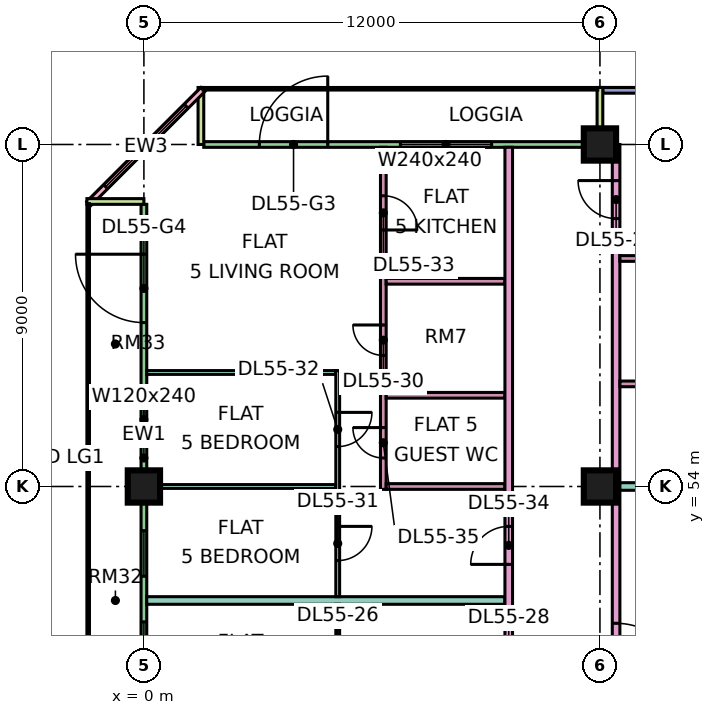
"""IFC4 building model, lengths in metres.
Left out: names, types, materials, properties, quantities, classifications, styles, units other than length and angle.
Written with IfcOpenShell. Run it as: python <this file> out.ifc"""

import sys

from ifc_helpers import new_model, si_unit, direction, frame, frame_2d, origin, origin_2d, place, context, subcontext, project, spatial, rectangle, extrude, element, fill, save


model = new_model("IFC4")
c1 = context("Model", 3, precision=1e-05, world=origin(), true_north=direction((0.0, 1.0)))
c2 = subcontext(c1, "Body", "Model", "MODEL_VIEW")
j1 = project(units=[si_unit("LENGTHUNIT", "METRE"), si_unit("PLANEANGLEUNIT", "RADIAN")], contexts=[c1])
p1 = place(None, origin())
s1 = spatial("IfcSite", under=j1, at=p1, CompositionType="ELEMENT")
p2 = place(p1, origin())
s2 = spatial("IfcBuilding", under=s1, at=p2, CompositionType="ELEMENT")
p3 = place(p2, frame((0.0, 0.0, 234.15)))
s3 = spatial("IfcBuildingStorey", under=s2, at=p3, CompositionType="ELEMENT", Elevation=234.15)
for number, where, z_axis, x_axis in (
    (1, (0.0, 54.0, 0.0), (0.0, 0.0, 1.0), (1.0, 0.0, 0.0)),
    (2, (12.0, 54.0, 0.0), (0.0, 0.0, 1.0), (1.0, 0.0, 0.0)),
    (3, (12.0, 63.0, 0.0), (0.0, 0.0, 1.0), (1.0, 0.0, 0.0)),
):
    element("IfcColumn", number, at=place(p3, frame(where, z_axis=z_axis, x_axis=x_axis)), inside=s3, PredefinedType="COLUMN", context=c2, shape_type="SweptSolid", body=[
        extrude(rectangle(XDim=0.85, YDim=0.85, at=origin_2d()), origin(), (0.0, 0.0, 1.0), 3.75),
    ])
p4 = place(p3, frame((22.5, 64.425, 0.0), z_axis=(0.0, 0.0, 1.0), x_axis=(-1.0, 0.0, 0.0)))
e4 = element("IfcWall", 4, at=p4, inside=s3, PredefinedType="SOLIDWALL", context=c2, shape_type="SweptSolid", body=[
    extrude(rectangle(XDim=10.425, YDim=0.15, at=frame_2d((5.212, 0.0))), origin(), (0.0, 0.0, 1.0), 3.35),
])
p5 = place(p4, frame((0.538, 0.0, 0.45)))
e5 = element("IfcOpeningElement", 5, at=p5, cuts=e4, PredefinedType="OPENING", context=c2, shape_type="SweptSolid", body=[
    extrude(rectangle(XDim=2.4, YDim=2.4, at=frame_2d((1.2, 1.2))), frame((0.0, 0.085, 0.0), z_axis=(0.0, -1.0, 0.0), x_axis=(1.0, 0.0, 0.0)), (0.0, 0.0, 1.0), 0.17),
])
p6 = place(p4, frame((5.275, 0.0, 0.45)))
e6 = element("IfcOpeningElement", 6, at=p6, cuts=e4, PredefinedType="OPENING", context=c2, shape_type="SweptSolid", body=[
    extrude(rectangle(XDim=3.0, YDim=2.4, at=frame_2d((1.5, 1.2))), frame((0.0, 0.085, 0.0), z_axis=(0.0, -1.0, 0.0), x_axis=(1.0, 0.0, 0.0)), (0.0, 0.0, 1.0), 0.17),
])
p7 = place(p3, frame((11.925, 63.0, 0.0), z_axis=(0.0, 0.0, 1.0), x_axis=(-1.0, 0.0, 0.0)))
e7 = element("IfcWall", 7, at=p7, inside=s3, PredefinedType="SOLIDWALL", context=c2, shape_type="SweptSolid", body=[
    extrude(rectangle(XDim=10.35, YDim=0.15, at=frame_2d((5.175, 0.0))), origin(), (0.0, 0.0, 1.0), 3.35),
])
p8 = place(p7, frame((2.775, 0.0, 0.45)))
e8 = element("IfcOpeningElement", 8, at=p8, cuts=e7, PredefinedType="OPENING", context=c2, shape_type="SweptSolid", body=[
    extrude(rectangle(XDim=2.4, YDim=2.4, at=frame_2d((1.2, 1.2))), frame((0.0, 0.085, 0.0), z_axis=(0.0, -1.0, 0.0), x_axis=(1.0, 0.0, 0.0)), (0.0, 0.0, 1.0), 0.17),
])
p9 = place(p7, frame((7.087, 0.0, 0.0)))
e9 = element("IfcOpeningElement", 9, at=p9, cuts=e7, PredefinedType="OPENING", context=c2, shape_type="SweptSolid", body=[
    extrude(rectangle(XDim=1.8, YDim=2.4, at=frame_2d((0.9, 1.2))), frame((0.0, 0.085, 0.0), z_axis=(0.0, -1.0, 0.0), x_axis=(1.0, 0.0, 0.0)), (0.0, 0.0, 1.0), 0.17),
])
for number, where, z_axis, x_axis in (
    (10, (12.0, 64.5, 0.0), (0.0, 0.0, 1.0), (0.0, -1.0, 0.0)),
    (11, (1.5, 64.5, 0.0), (0.0, 0.0, 1.0), (0.0, -1.0, 0.0)),
):
    element("IfcWall", number, at=place(p3, frame(where, z_axis=z_axis, x_axis=x_axis)), inside=s3, PredefinedType="SOLIDWALL", context=c2, shape_type="SweptSolid", body=[
        extrude(rectangle(XDim=1.5, YDim=0.15, at=frame_2d((0.75, 0.0))), origin(), (0.0, 0.0, 1.0), 3.35),
    ])
p10 = place(p3, frame((1.553, 64.447, 0.0), z_axis=(0.0, 0.0, 1.0), x_axis=(-0.707106781187, -0.707106781187, 0.0)))
e12 = element("IfcWall", 12, at=p10, inside=s3, PredefinedType="SOLIDWALL", context=c2, shape_type="SweptSolid", body=[
    extrude(rectangle(XDim=4.243, YDim=0.15, at=frame_2d((2.121, 0.0))), origin(), (0.0, 0.0, 1.0), 3.35),
])
p11 = place(p10, frame((0.621, 0.0, 0.45)))
e13 = element("IfcOpeningElement", 13, at=p11, cuts=e12, PredefinedType="OPENING", context=c2, shape_type="SweptSolid", body=[
    extrude(rectangle(XDim=3.0, YDim=2.4, at=frame_2d((1.5, 1.2))), frame((0.0, 0.085, 0.0), z_axis=(0.0, -1.0, 0.0), x_axis=(1.0, 0.0, 0.0)), (0.0, 0.0, 1.0), 0.17),
])
p12 = place(p3, frame((0.0, 61.425, 0.0), z_axis=(0.0, 0.0, 1.0), x_axis=(0.0, -1.0, 0.0)))
e14 = element("IfcWall", 14, at=p12, inside=s3, PredefinedType="SOLIDWALL", context=c2, shape_type="SweptSolid", body=[
    extrude(rectangle(XDim=13.35, YDim=0.15, at=frame_2d((6.675, 0.0))), origin(), (0.0, 0.0, 1.0), 3.35),
])
p13 = place(p12, frame((1.312, 0.0, 0.0)))
e15 = element("IfcOpeningElement", 15, at=p13, cuts=e14, PredefinedType="OPENING", context=c2, shape_type="SweptSolid", body=[
    extrude(rectangle(XDim=1.8, YDim=2.4, at=frame_2d((0.9, 1.2))), frame((0.0, 0.085, 0.0), z_axis=(0.0, -1.0, 0.0), x_axis=(1.0, 0.0, 0.0)), (0.0, 0.0, 1.0), 0.17),
])
p14 = place(p12, frame((5.062, 0.0, 0.45)))
e16 = element("IfcOpeningElement", 16, at=p14, cuts=e14, PredefinedType="OPENING", context=c2, shape_type="SweptSolid", body=[
    extrude(rectangle(XDim=1.2, YDim=2.4, at=frame_2d((0.6, 1.2))), frame((0.0, 0.085, 0.0), z_axis=(0.0, -1.0, 0.0), x_axis=(1.0, 0.0, 0.0)), (0.0, 0.0, 1.0), 0.17),
])
p15 = place(p12, frame((8.587, 0.0, 0.45)))
e17 = element("IfcOpeningElement", 17, at=p15, cuts=e14, PredefinedType="OPENING", context=c2, shape_type="SweptSolid", body=[
    extrude(rectangle(XDim=1.2, YDim=2.4, at=frame_2d((0.6, 1.2))), frame((0.0, 0.085, 0.0), z_axis=(0.0, -1.0, 0.0), x_axis=(1.0, 0.0, 0.0)), (0.0, 0.0, 1.0), 0.17),
])
p16 = place(p12, frame((10.988, 0.0, 0.45)))
e18 = element("IfcOpeningElement", 18, at=p16, cuts=e14, PredefinedType="OPENING", context=c2, shape_type="SweptSolid", body=[
    extrude(rectangle(XDim=1.8, YDim=2.4, at=frame_2d((0.9, 1.2))), frame((0.0, 0.085, 0.0), z_axis=(0.0, -1.0, 0.0), x_axis=(1.0, 0.0, 0.0)), (0.0, 0.0, 1.0), 0.17),
])
p17 = place(p3, frame((-1.5, 61.5, 0.0), z_axis=(0.0, 0.0, 1.0), x_axis=(1.0, 0.0, 0.0)))
e19 = element("IfcWall", 19, at=p17, inside=s3, PredefinedType="SOLIDWALL", context=c2, shape_type="SweptSolid", body=[
    extrude(rectangle(XDim=1.5, YDim=0.15, at=frame_2d((0.75, 0.0))), origin(), (0.0, 0.0, 1.0), 3.35),
])
p18 = place(p3, frame((0.074, 51.0, 0.0), z_axis=(0.0, 0.0, 1.0), x_axis=(1.0, 0.0, 0.0)))
e20 = element("IfcWall", 20, at=p18, inside=s3, PredefinedType="PARTITIONING", context=c2, shape_type="SweptSolid", body=[
    extrude(rectangle(XDim=9.426, YDim=0.2, at=frame_2d((4.713, 0.0))), origin(), (0.0, 0.0, 1.0), 3.35),
])
for number, where, z_axis, x_axis in (
    (21, (0.074, 54.0, 0.0), (0.0, 0.0, 1.0), (1.0, 0.0, 0.0)),
    (22, (0.074, 57.0, 0.0), (0.0, 0.0, 1.0), (1.0, 0.0, 0.0)),
):
    element("IfcWall", number, at=place(p3, frame(where, z_axis=z_axis, x_axis=x_axis)), inside=s3, PredefinedType="PARTITIONING", context=c2, shape_type="SweptSolid", body=[
        extrude(rectangle(XDim=4.976, YDim=0.1, at=frame_2d((2.488, 0.0))), origin(), (0.0, 0.0, 1.0), 3.35),
    ])
p19 = place(p3, frame((5.1, 44.95, 0.0), z_axis=(0.0, 0.0, 1.0), x_axis=(0.0, 1.0, 0.0)))
e23 = element("IfcWall", 23, at=p19, inside=s3, PredefinedType="PARTITIONING", context=c2, shape_type="SweptSolid", body=[
    extrude(rectangle(XDim=5.95, YDim=0.1, at=frame_2d((2.975, 0.0))), origin(), (0.0, 0.0, 1.0), 3.35),
])
p20 = place(p19, frame((1.1, 0.0, 0.0)))
e24 = element("IfcOpeningElement", 24, at=p20, cuts=e23, PredefinedType="OPENING", context=c2, shape_type="SweptSolid", body=[
    extrude(rectangle(XDim=0.9, YDim=2.1, at=frame_2d((0.45, 1.05))), frame((0.0, 0.06, 0.0), z_axis=(0.0, -1.0, 0.0), x_axis=(1.0, 0.0, 0.0)), (0.0, 0.0, 1.0), 0.12),
])
p21 = place(p19, frame((4.1, 0.0, 0.0)))
e25 = element("IfcOpeningElement", 25, at=p21, cuts=e23, PredefinedType="OPENING", context=c2, shape_type="SweptSolid", body=[
    extrude(rectangle(XDim=0.9, YDim=2.1, at=frame_2d((0.45, 1.05))), frame((0.0, 0.06, 0.0), z_axis=(0.0, -1.0, 0.0), x_axis=(1.0, 0.0, 0.0)), (0.0, 0.0, 1.0), 0.12),
])
p22 = place(p3, frame((5.1, 51.1, 0.0), z_axis=(0.0, 0.0, 1.0), x_axis=(0.0, 1.0, 0.0)))
e26 = element("IfcWall", 26, at=p22, inside=s3, PredefinedType="PARTITIONING", context=c2, shape_type="SweptSolid", body=[
    extrude(rectangle(XDim=5.95, YDim=0.1, at=frame_2d((2.975, 0.0))), origin(), (0.0, 0.0, 1.0), 3.35),
])
p23 = place(p22, frame((0.95, 0.0, 0.0)))
e27 = element("IfcOpeningElement", 27, at=p23, cuts=e26, PredefinedType="OPENING", context=c2, shape_type="SweptSolid", body=[
    extrude(rectangle(XDim=0.9, YDim=2.1, at=frame_2d((0.45, 1.05))), frame((0.0, 0.06, 0.0), z_axis=(0.0, -1.0, 0.0), x_axis=(1.0, 0.0, 0.0)), (0.0, 0.0, 1.0), 0.12),
])
p24 = place(p22, frame((3.95, 0.0, 0.0)))
e28 = element("IfcOpeningElement", 28, at=p24, cuts=e26, PredefinedType="OPENING", context=c2, shape_type="SweptSolid", body=[
    extrude(rectangle(XDim=0.9, YDim=2.1, at=frame_2d((0.45, 1.05))), frame((0.0, 0.06, 0.0), z_axis=(0.0, -1.0, 0.0), x_axis=(1.0, 0.0, 0.0)), (0.0, 0.0, 1.0), 0.12),
])
p25 = place(p3, frame((6.3, 53.925, 0.0), z_axis=(0.0, 0.0, 1.0), x_axis=(0.0, 1.0, 0.0)))
e29 = element("IfcWall", 29, at=p25, inside=s3, PredefinedType="PARTITIONING", context=c2, shape_type="SweptSolid", body=[
    extrude(rectangle(XDim=9.001, YDim=0.15, at=frame_2d((4.5, 0.0))), origin(), (0.0, 0.0, 1.0), 3.35),
])
p26 = place(p25, frame((3.525, 0.0, 0.0)))
e30 = element("IfcOpeningElement", 30, at=p26, cuts=e29, PredefinedType="OPENING", context=c2, shape_type="SweptSolid", body=[
    extrude(rectangle(XDim=0.8, YDim=2.1, at=frame_2d((0.4, 1.05))), frame((0.0, 0.085, 0.0), z_axis=(0.0, -1.0, 0.0), x_axis=(1.0, 0.0, 0.0)), (0.0, 0.0, 1.0), 0.17),
])
p27 = place(p25, frame((6.825, 0.0, 0.0)))
e31 = element("IfcOpeningElement", 31, at=p27, cuts=e29, PredefinedType="OPENING", context=c2, shape_type="SweptSolid", body=[
    extrude(rectangle(XDim=0.9, YDim=2.1, at=frame_2d((0.45, 1.05))), frame((0.0, 0.085, 0.0), z_axis=(0.0, -1.0, 0.0), x_axis=(1.0, 0.0, 0.0)), (0.0, 0.0, 1.0), 0.17),
])
p28 = place(p25, frame((0.825, 0.0, 0.0)))
e32 = element("IfcOpeningElement", 32, at=p28, cuts=e29, PredefinedType="OPENING", context=c2, shape_type="SweptSolid", body=[
    extrude(rectangle(XDim=0.8, YDim=2.1, at=frame_2d((0.4, 1.05))), frame((0.0, 0.085, 0.0), z_axis=(0.0, -1.0, 0.0), x_axis=(1.0, 0.0, 0.0)), (0.0, 0.0, 1.0), 0.17),
])
for number, where, z_axis, x_axis in (
    (33, (6.375, 54.0, 0.0), (0.0, 0.0, 1.0), (1.0, 0.0, 0.0)),
    (34, (6.375, 56.4, 0.0), (0.0, 0.0, 1.0), (1.0, 0.0, 0.0)),
    (35, (6.375, 59.4, 0.0), (0.0, 0.0, 1.0), (1.0, 0.0, 0.0)),
):
    element("IfcWall", number, at=place(p3, frame(where, z_axis=z_axis, x_axis=x_axis)), inside=s3, PredefinedType="PARTITIONING", context=c2, shape_type="SweptSolid", body=[
        extrude(rectangle(XDim=3.125, YDim=0.15, at=frame_2d((1.562, 0.0))), origin(), (0.0, 0.0, 1.0), 3.35),
    ])
p29 = place(p3, frame((9.6, 20.0, 0.0), z_axis=(0.0, 0.0, 1.0), x_axis=(0.0, 1.0, 0.0)))
e36 = element("IfcWall", 36, at=p29, inside=s3, PredefinedType="PARTITIONING", context=c2, shape_type="SweptSolid", body=[
    extrude(rectangle(XDim=42.926, YDim=0.2, at=frame_2d((21.463, 0.0))), origin(), (0.0, 0.0, 1.0), 3.35),
])
p30 = place(p29, frame((28.95, 0.0, 0.0)))
e37 = element("IfcOpeningElement", 37, at=p30, cuts=e36, PredefinedType="OPENING", context=c2, shape_type="SweptSolid", body=[
    extrude(rectangle(XDim=1.0, YDim=2.1, at=frame_2d((0.5, 1.05))), frame((0.0, 0.11, 0.0), z_axis=(0.0, -1.0, 0.0), x_axis=(1.0, 0.0, 0.0)), (0.0, 0.0, 1.0), 0.22),
])
p31 = place(p29, frame((31.95, 0.0, 0.0)))
e38 = element("IfcOpeningElement", 38, at=p31, cuts=e36, PredefinedType="OPENING", context=c2, shape_type="SweptSolid", body=[
    extrude(rectangle(XDim=1.0, YDim=2.1, at=frame_2d((0.5, 1.05))), frame((0.0, 0.11, 0.0), z_axis=(0.0, -1.0, 0.0), x_axis=(1.0, 0.0, 0.0)), (0.0, 0.0, 1.0), 0.22),
])
p32 = place(p29, frame((0.6, 0.0, 0.0)))
e39 = element("IfcOpeningElement", 39, at=p32, cuts=e36, PredefinedType="OPENING", context=c2, shape_type="SweptSolid", body=[
    extrude(rectangle(XDim=1.2, YDim=2.1, at=frame_2d((0.6, 1.05))), frame((0.0, 0.11, 0.0), z_axis=(0.0, -1.0, 0.0), x_axis=(1.0, 0.0, 0.0)), (0.0, 0.0, 1.0), 0.22),
])
p33 = place(p29, frame((11.25, 0.0, 0.0)))
e40 = element("IfcOpeningElement", 40, at=p33, cuts=e36, PredefinedType="OPENING", context=c2, shape_type="SweptSolid", body=[
    extrude(rectangle(XDim=1.0, YDim=2.1, at=frame_2d((0.5, 1.05))), frame((0.0, 0.11, 0.0), z_axis=(0.0, -1.0, 0.0), x_axis=(1.0, 0.0, 0.0)), (0.0, 0.0, 1.0), 0.22),
])
p34 = place(p3, frame((12.425, 20.0, 0.0), z_axis=(0.0, 0.0, 1.0), x_axis=(0.0, 1.0, 0.0)))
e41 = element("IfcWall", 41, at=p34, inside=s3, PredefinedType="PARTITIONING", context=c2, shape_type="SweptSolid", body=[
    extrude(rectangle(XDim=43.0, YDim=0.2, at=frame_2d((21.5, 0.0))), origin(), (0.0, 0.0, 1.0), 3.35),
])
p35 = place(p34, frame((5.95, 0.0, 0.0)))
e42 = element("IfcOpeningElement", 42, at=p35, cuts=e41, PredefinedType="OPENING", context=c2, shape_type="SweptSolid", body=[
    extrude(rectangle(XDim=1.0, YDim=2.1, at=frame_2d((0.5, 1.05))), frame((0.0, 0.11, 0.0), z_axis=(0.0, -1.0, 0.0), x_axis=(1.0, 0.0, 0.0)), (0.0, 0.0, 1.0), 0.22),
])
p36 = place(p34, frame((12.0, 0.0, 0.0)))
e43 = element("IfcOpeningElement", 43, at=p36, cuts=e41, PredefinedType="OPENING", context=c2, shape_type="SweptSolid", body=[
    extrude(rectangle(XDim=1.0, YDim=2.1, at=frame_2d((0.5, 1.05))), frame((0.0, 0.11, 0.0), z_axis=(0.0, -1.0, 0.0), x_axis=(1.0, 0.0, 0.0)), (0.0, 0.0, 1.0), 0.22),
])
p37 = place(p34, frame((16.9, 0.0, 0.0)))
e44 = element("IfcOpeningElement", 44, at=p37, cuts=e41, PredefinedType="OPENING", context=c2, shape_type="SweptSolid", body=[
    extrude(rectangle(XDim=1.0, YDim=2.1, at=frame_2d((0.5, 1.05))), frame((0.0, 0.11, 0.0), z_axis=(0.0, -1.0, 0.0), x_axis=(1.0, 0.0, 0.0)), (0.0, 0.0, 1.0), 0.22),
])
p38 = place(p34, frame((41.05, 0.0, 0.0)))
e45 = element("IfcOpeningElement", 45, at=p38, cuts=e41, PredefinedType="OPENING", context=c2, shape_type="SweptSolid", body=[
    extrude(rectangle(XDim=1.0, YDim=2.1, at=frame_2d((0.5, 1.05))), frame((0.0, 0.11, 0.0), z_axis=(0.0, -1.0, 0.0), x_axis=(1.0, 0.0, 0.0)), (0.0, 0.0, 1.0), 0.22),
])
p39 = place(p34, frame((1.15, 0.0, 0.0)))
e46 = element("IfcOpeningElement", 46, at=p39, cuts=e41, PredefinedType="OPENING", context=c2, shape_type="SweptSolid", body=[
    extrude(rectangle(XDim=1.8, YDim=2.1, at=frame_2d((0.9, 1.05))), frame((0.0, 0.11, 0.0), z_axis=(0.0, -1.0, 0.0), x_axis=(1.0, 0.0, 0.0)), (0.0, 0.0, 1.0), 0.22),
])
p40 = place(p34, frame((28.6, 0.0, 0.0)))
e47 = element("IfcOpeningElement", 47, at=p40, cuts=e41, PredefinedType="OPENING", context=c2, shape_type="SweptSolid", body=[
    extrude(rectangle(XDim=1.8, YDim=2.1, at=frame_2d((0.9, 1.05))), frame((0.0, 0.11, 0.0), z_axis=(0.0, -1.0, 0.0), x_axis=(1.0, 0.0, 0.0)), (0.0, 0.0, 1.0), 0.22),
])
p41 = place(p3, frame((12.525, 54.0, 0.0), z_axis=(0.0, 0.0, 1.0), x_axis=(1.0, 0.0, 0.0)))
e48 = element("IfcWall", 48, at=p41, inside=s3, PredefinedType="PARTITIONING", context=c2, shape_type="SweptSolid", body=[
    extrude(rectangle(XDim=11.401, YDim=0.2, at=frame_2d((5.701, 0.0))), origin(), (0.0, 0.0, 1.0), 3.35),
])
for number, where, z_axis, x_axis in (
    (49, (12.525, 56.7, 0.0), (0.0, 0.0, 1.0), (1.0, 0.0, 0.0)),
    (50, (12.525, 60.0, 0.0), (0.0, 0.0, 1.0), (1.0, 0.0, 0.0)),
):
    element("IfcWall", number, at=place(p3, frame(where, z_axis=z_axis, x_axis=x_axis)), inside=s3, PredefinedType="PARTITIONING", context=c2, shape_type="SweptSolid", body=[
        extrude(rectangle(XDim=5.225, YDim=0.15, at=frame_2d((2.613, 0.0))), origin(), (0.0, 0.0, 1.0), 3.35),
    ])
p42 = place(p8, origin())
e51 = element("IfcWindow", 51, at=p42, inside=s3, PartitioningType="SINGLE_PANEL", PredefinedType="WINDOW", context=c2, shape_type="SweptSolid", body=[
    extrude(rectangle(XDim=2.4, YDim=2.4, at=frame_2d((1.2, 1.2))), frame((0.0, 0.03, 0.0), z_axis=(0.0, -1.0, 0.0), x_axis=(1.0, 0.0, 0.0)), (0.0, 0.0, 1.0), 0.06),
])
fill(e8, e51)
p43 = place(p9, frame((1.8, 0.0, 0.0), z_axis=(0.0, 0.0, 1.0), x_axis=(-1.0, 0.0, 0.0)))
e52 = element("IfcDoor", 52, at=p43, inside=s3, OperationType="DOUBLE_DOOR_SINGLE_SWING", PredefinedType="DOOR", context=c2, shape_type="SweptSolid", body=[
    extrude(rectangle(XDim=1.8, YDim=2.4, at=frame_2d((0.9, 1.2))), frame((0.0, 0.025, 0.0), z_axis=(0.0, -1.0, 0.0), x_axis=(1.0, 0.0, 0.0)), (0.0, 0.0, 1.0), 0.05),
])
fill(e9, e52)
p44 = place(p11, origin())
e53 = element("IfcWindow", 53, at=p44, inside=s3, PartitioningType="SINGLE_PANEL", PredefinedType="WINDOW", context=c2, shape_type="SweptSolid", body=[
    extrude(rectangle(XDim=3.0, YDim=2.4, at=frame_2d((1.5, 1.2))), frame((0.0, 0.03, 0.0), z_axis=(0.0, -1.0, 0.0), x_axis=(1.0, 0.0, 0.0)), (0.0, 0.0, 1.0), 0.06),
])
fill(e13, e53)
p45 = place(p13, frame((1.8, 0.0, 0.0), z_axis=(0.0, 0.0, 1.0), x_axis=(-1.0, 0.0, 0.0)))
e54 = element("IfcDoor", 54, at=p45, inside=s3, OperationType="DOUBLE_DOOR_SINGLE_SWING", PredefinedType="DOOR", context=c2, shape_type="SweptSolid", body=[
    extrude(rectangle(XDim=1.8, YDim=2.4, at=frame_2d((0.9, 1.2))), frame((0.0, 0.025, 0.0), z_axis=(0.0, -1.0, 0.0), x_axis=(1.0, 0.0, 0.0)), (0.0, 0.0, 1.0), 0.05),
])
fill(e15, e54)
p46 = place(p14, origin())
e55 = element("IfcWindow", 55, at=p46, inside=s3, PartitioningType="SINGLE_PANEL", PredefinedType="WINDOW", context=c2, shape_type="SweptSolid", body=[
    extrude(rectangle(XDim=1.2, YDim=2.4, at=frame_2d((0.6, 1.2))), frame((0.0, 0.03, 0.0), z_axis=(0.0, -1.0, 0.0), x_axis=(1.0, 0.0, 0.0)), (0.0, 0.0, 1.0), 0.06),
])
fill(e16, e55)
p47 = place(p15, origin())
e56 = element("IfcWindow", 56, at=p47, inside=s3, PartitioningType="SINGLE_PANEL", PredefinedType="WINDOW", context=c2, shape_type="SweptSolid", body=[
    extrude(rectangle(XDim=1.2, YDim=2.4, at=frame_2d((0.6, 1.2))), frame((0.0, 0.03, 0.0), z_axis=(0.0, -1.0, 0.0), x_axis=(1.0, 0.0, 0.0)), (0.0, 0.0, 1.0), 0.06),
])
fill(e17, e56)
p48 = place(p16, origin())
e57 = element("IfcWindow", 57, at=p48, inside=s3, PartitioningType="SINGLE_PANEL", PredefinedType="WINDOW", context=c2, shape_type="SweptSolid", body=[
    extrude(rectangle(XDim=1.8, YDim=2.4, at=frame_2d((0.9, 1.2))), frame((0.0, 0.03, 0.0), z_axis=(0.0, -1.0, 0.0), x_axis=(1.0, 0.0, 0.0)), (0.0, 0.0, 1.0), 0.06),
])
fill(e18, e57)
p49 = place(p38, frame((1.0, 0.0, 0.0), z_axis=(0.0, 0.0, 1.0), x_axis=(-1.0, 0.0, 0.0)))
e58 = element("IfcDoor", 58, at=p49, inside=s3, OperationType="SINGLE_SWING_RIGHT", PredefinedType="DOOR", context=c2, shape_type="SweptSolid", body=[
    extrude(rectangle(XDim=1.0, YDim=2.1, at=frame_2d((0.5, 1.05))), frame((0.0, 0.025, 0.0), z_axis=(0.0, -1.0, 0.0), x_axis=(1.0, 0.0, 0.0)), (0.0, 0.0, 1.0), 0.05),
])
fill(e45, e58)
p50 = place(p26, frame((0.8, 0.0, 0.0), z_axis=(0.0, 0.0, 1.0), x_axis=(-1.0, 0.0, 0.0)))
e59 = element("IfcDoor", 59, at=p50, inside=s3, OperationType="SINGLE_SWING_RIGHT", PredefinedType="DOOR", context=c2, shape_type="SweptSolid", body=[
    extrude(rectangle(XDim=0.8, YDim=2.1, at=frame_2d((0.4, 1.05))), frame((0.0, 0.025, 0.0), z_axis=(0.0, -1.0, 0.0), x_axis=(1.0, 0.0, 0.0)), (0.0, 0.0, 1.0), 0.05),
])
fill(e30, e59)
p51 = place(p23, origin())
e60 = element("IfcDoor", 60, at=p51, inside=s3, OperationType="SINGLE_SWING_RIGHT", PredefinedType="DOOR", context=c2, shape_type="SweptSolid", body=[
    extrude(rectangle(XDim=0.9, YDim=2.1, at=frame_2d((0.45, 1.05))), frame((0.0, 0.025, 0.0), z_axis=(0.0, -1.0, 0.0), x_axis=(1.0, 0.0, 0.0)), (0.0, 0.0, 1.0), 0.05),
])
fill(e27, e60)
p52 = place(p24, origin())
e61 = element("IfcDoor", 61, at=p52, inside=s3, OperationType="SINGLE_SWING_RIGHT", PredefinedType="DOOR", context=c2, shape_type="SweptSolid", body=[
    extrude(rectangle(XDim=0.9, YDim=2.1, at=frame_2d((0.45, 1.05))), frame((0.0, 0.025, 0.0), z_axis=(0.0, -1.0, 0.0), x_axis=(1.0, 0.0, 0.0)), (0.0, 0.0, 1.0), 0.05),
])
fill(e28, e61)
p53 = place(p27, frame((0.9, 0.0, 0.0), z_axis=(0.0, 0.0, 1.0), x_axis=(-1.0, 0.0, 0.0)))
e62 = element("IfcDoor", 62, at=p53, inside=s3, OperationType="SINGLE_SWING_LEFT", PredefinedType="DOOR", context=c2, shape_type="SweptSolid", body=[
    extrude(rectangle(XDim=0.9, YDim=2.1, at=frame_2d((0.45, 1.05))), frame((0.0, 0.025, 0.0), z_axis=(0.0, -1.0, 0.0), x_axis=(1.0, 0.0, 0.0)), (0.0, 0.0, 1.0), 0.05),
])
fill(e31, e62)
p54 = place(p31, origin())
e63 = element("IfcDoor", 63, at=p54, inside=s3, OperationType="SINGLE_SWING_LEFT", PredefinedType="DOOR", context=c2, shape_type="SweptSolid", body=[
    extrude(rectangle(XDim=1.0, YDim=2.1, at=frame_2d((0.5, 1.05))), frame((0.0, 0.025, 0.0), z_axis=(0.0, -1.0, 0.0), x_axis=(1.0, 0.0, 0.0)), (0.0, 0.0, 1.0), 0.05),
])
fill(e38, e63)
p55 = place(p28, frame((0.8, 0.0, 0.0), z_axis=(0.0, 0.0, 1.0), x_axis=(-1.0, 0.0, 0.0)))
e64 = element("IfcDoor", 64, at=p55, inside=s3, OperationType="SINGLE_SWING_RIGHT", PredefinedType="DOOR", context=c2, shape_type="SweptSolid", body=[
    extrude(rectangle(XDim=0.8, YDim=2.1, at=frame_2d((0.4, 1.05))), frame((0.0, 0.025, 0.0), z_axis=(0.0, -1.0, 0.0), x_axis=(1.0, 0.0, 0.0)), (0.0, 0.0, 1.0), 0.05),
])
fill(e32, e64)
p56 = place(p40, frame((1.8, 0.0, 0.0), z_axis=(0.0, 0.0, 1.0), x_axis=(-1.0, 0.0, 0.0)))
e65 = element("IfcDoor", 65, at=p56, inside=s3, OperationType="DOUBLE_DOOR_SINGLE_SWING", PredefinedType="DOOR", context=c2, shape_type="SweptSolid", body=[
    extrude(rectangle(XDim=1.8, YDim=2.1, at=frame_2d((0.9, 1.05))), frame((0.0, 0.025, 0.0), z_axis=(0.0, -1.0, 0.0), x_axis=(1.0, 0.0, 0.0)), (0.0, 0.0, 1.0), 0.05),
])
fill(e47, e65)
save(model, sys.argv[1])
